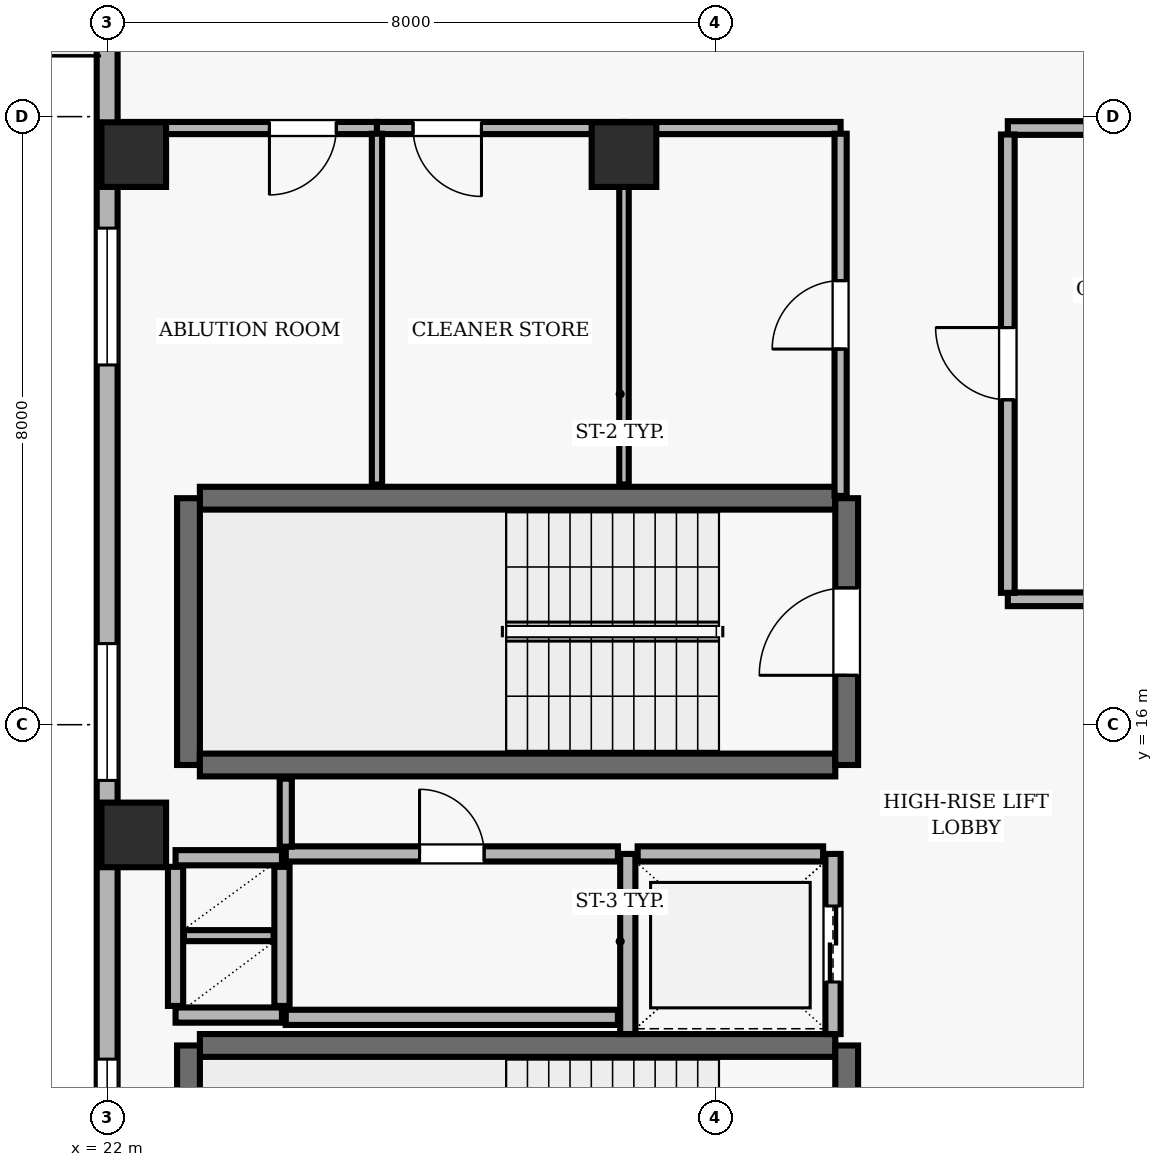
"""IFC4 building model, lengths in metres.
Left out: names, types, materials, properties, quantities, classifications, styles, units other than length and angle.
Written with IfcOpenShell. Run it as: python <this file> out.ifc"""

import sys

from ifc_helpers import new_model, si_unit, direction, frame, frame_2d, origin, origin_2d, place, context, subcontext, project, spatial, rectangle, extrude, element, fill, save


model = new_model("IFC4")
c1 = context("Model", 3, precision=1e-05, world=origin(), true_north=direction((0.0, 1.0)))
c2 = subcontext(c1, "Body", "Model", "MODEL_VIEW")
j1 = project(units=[si_unit("LENGTHUNIT", "METRE"), si_unit("PLANEANGLEUNIT", "RADIAN")], contexts=[c1])
p1 = place(None, origin())
s1 = spatial("IfcSite", under=j1, at=p1, CompositionType="ELEMENT")
p2 = place(p1, origin())
s2 = spatial("IfcBuilding", under=s1, at=p2, CompositionType="ELEMENT")
p3 = place(p2, frame((0.0, 0.0, 283.3)))
s3 = spatial("IfcBuildingStorey", under=s2, at=p3, CompositionType="ELEMENT", Elevation=283.3)
for number, where, z_axis, x_axis in (
    (1, (22.35, 14.55, 0.0), (0.0, 0.0, 1.0), (1.0, 0.0, 0.0)),
    (2, (22.35, 23.5, 0.0), (0.0, 0.0, 1.0), (1.0, 0.0, 0.0)),
    (3, (28.8, 23.5, 0.0), (0.0, 0.0, 1.0), (1.0, 0.0, 0.0)),
):
    element("IfcColumn", number, at=place(p3, frame(where, z_axis=z_axis, x_axis=x_axis)), inside=s3, PredefinedType="COLUMN", context=c2, shape_type="SweptSolid", body=[
        extrude(rectangle(XDim=0.85, YDim=0.85, at=origin_2d()), origin(), (0.0, 0.0, 1.0), 3.9),
    ])
p4 = place(p3, frame((22.0, 35.3, 0.0), z_axis=(0.0, 0.0, 1.0), x_axis=(0.0, -1.0, 0.0)))
e4 = element("IfcWall", 4, at=p4, inside=s3, PredefinedType="SOLIDWALL", context=c2, shape_type="SweptSolid", body=[
    extrude(rectangle(XDim=32.8, YDim=0.275, at=frame_2d((16.4, 0.0))), origin(), (0.0, 0.0, 1.0), 3.69),
])
p5 = place(p4, frame((7.3, 0.0, 0.0)))
e5 = element("IfcOpeningElement", 5, at=p5, cuts=e4, PredefinedType="OPENING", context=c2, shape_type="SweptSolid", body=[
    extrude(rectangle(XDim=1.0, YDim=2.2, at=frame_2d((0.5, 1.1))), frame((0.0, 0.147, 0.0), z_axis=(0.0, -1.0, 0.0), x_axis=(1.0, 0.0, 0.0)), (0.0, 0.0, 1.0), 0.295),
])
p6 = place(p4, frame((12.767, 0.0, 0.9)))
e6 = element("IfcOpeningElement", 6, at=p6, cuts=e4, PredefinedType="OPENING", context=c2, shape_type="SweptSolid", body=[
    extrude(rectangle(XDim=1.8, YDim=2.2, at=frame_2d((0.9, 1.1))), frame((0.0, 0.147, 0.0), z_axis=(0.0, -1.0, 0.0), x_axis=(1.0, 0.0, 0.0)), (0.0, 0.0, 1.0), 0.295),
])
p7 = place(p4, frame((18.233, 0.0, 0.9)))
e7 = element("IfcOpeningElement", 7, at=p7, cuts=e4, PredefinedType="OPENING", context=c2, shape_type="SweptSolid", body=[
    extrude(rectangle(XDim=1.8, YDim=2.2, at=frame_2d((0.9, 1.1))), frame((0.0, 0.147, 0.0), z_axis=(0.0, -1.0, 0.0), x_axis=(1.0, 0.0, 0.0)), (0.0, 0.0, 1.0), 0.295),
])
p8 = place(p4, frame((23.7, 0.0, 0.9)))
e8 = element("IfcOpeningElement", 8, at=p8, cuts=e4, PredefinedType="OPENING", context=c2, shape_type="SweptSolid", body=[
    extrude(rectangle(XDim=1.8, YDim=2.2, at=frame_2d((0.9, 1.1))), frame((0.0, 0.147, 0.0), z_axis=(0.0, -1.0, 0.0), x_axis=(1.0, 0.0, 0.0)), (0.0, 0.0, 1.0), 0.295),
])
p9 = place(p3, frame((31.58, 18.98, 0.0), z_axis=(0.0, 0.0, 1.0), x_axis=(-1.0, 0.0, 0.0)))
e9 = element("IfcWall", 9, at=p9, inside=s3, PredefinedType="SHEAR", context=c2, shape_type="SweptSolid", body=[
    extrude(rectangle(XDim=8.36, YDim=0.3, at=frame_2d((4.18, 0.0))), origin(), (0.0, 0.0, 1.0), 3.69),
])
p10 = place(p3, frame((23.07, 18.98, 0.0), z_axis=(0.0, 0.0, 1.0), x_axis=(0.0, -1.0, 0.0)))
e10 = element("IfcWall", 10, at=p10, inside=s3, PredefinedType="SHEAR", context=c2, shape_type="SweptSolid", body=[
    extrude(rectangle(XDim=3.51, YDim=0.3, at=frame_2d((1.755, 0.0))), origin(), (0.0, 0.0, 1.0), 3.69),
])
p11 = place(p3, frame((23.22, 15.47, 0.0), z_axis=(0.0, 0.0, 1.0), x_axis=(1.0, 0.0, 0.0)))
e11 = element("IfcWall", 11, at=p11, inside=s3, PredefinedType="SHEAR", context=c2, shape_type="SweptSolid", body=[
    extrude(rectangle(XDim=8.36, YDim=0.3, at=frame_2d((4.18, 0.0))), origin(), (0.0, 0.0, 1.0), 3.69),
])
p12 = place(p3, frame((31.73, 15.47, 0.0), z_axis=(0.0, 0.0, 1.0), x_axis=(0.0, 1.0, 0.0)))
e12 = element("IfcWall", 12, at=p12, inside=s3, PredefinedType="SHEAR", context=c2, shape_type="SweptSolid", body=[
    extrude(rectangle(XDim=3.51, YDim=0.3, at=frame_2d((1.755, 0.0))), origin(), (0.0, 0.0, 1.0), 3.69),
])
p13 = place(p12, frame((1.18, 0.0, 0.0)))
e13 = element("IfcOpeningElement", 13, at=p13, cuts=e12, PredefinedType="OPENING", context=c2, shape_type="SweptSolid", body=[
    extrude(rectangle(XDim=1.15, YDim=2.15, at=frame_2d((0.575, 1.075))), frame((0.0, 0.16, 0.0), z_axis=(0.0, -1.0, 0.0), x_axis=(1.0, 0.0, 0.0)), (0.0, 0.0, 1.0), 0.32),
])
p14 = place(p3, frame((31.58, 11.78, 0.0), z_axis=(0.0, 0.0, 1.0), x_axis=(-1.0, 0.0, 0.0)))
e14 = element("IfcWall", 14, at=p14, inside=s3, PredefinedType="SHEAR", context=c2, shape_type="SweptSolid", body=[
    extrude(rectangle(XDim=8.36, YDim=0.3, at=frame_2d((4.18, 0.0))), origin(), (0.0, 0.0, 1.0), 3.69),
])
p15 = place(p3, frame((23.07, 11.78, 0.0), z_axis=(0.0, 0.0, 1.0), x_axis=(0.0, -1.0, 0.0)))
e15 = element("IfcWall", 15, at=p15, inside=s3, PredefinedType="SHEAR", context=c2, shape_type="SweptSolid", body=[
    extrude(rectangle(XDim=3.51, YDim=0.3, at=frame_2d((1.755, 0.0))), origin(), (0.0, 0.0, 1.0), 3.69),
])
p16 = place(p3, frame((31.73, 8.27, 0.0), z_axis=(0.0, 0.0, 1.0), x_axis=(0.0, 1.0, 0.0)))
e16 = element("IfcWall", 16, at=p16, inside=s3, PredefinedType="SHEAR", context=c2, shape_type="SweptSolid", body=[
    extrude(rectangle(XDim=3.51, YDim=0.3, at=frame_2d((1.755, 0.0))), origin(), (0.0, 0.0, 1.0), 3.69),
])
p17 = place(p16, frame((1.18, 0.0, 0.0)))
e17 = element("IfcOpeningElement", 17, at=p17, cuts=e16, PredefinedType="OPENING", context=c2, shape_type="SweptSolid", body=[
    extrude(rectangle(XDim=1.15, YDim=2.15, at=frame_2d((0.575, 1.075))), frame((0.0, 0.16, 0.0), z_axis=(0.0, -1.0, 0.0), x_axis=(1.0, 0.0, 0.0)), (0.0, 0.0, 1.0), 0.32),
])
p18 = place(p3, frame((28.85, 14.3, 0.0), z_axis=(0.0, 0.0, 1.0), x_axis=(0.0, -1.0, 0.0)))
e18 = element("IfcWall", 18, at=p18, inside=s3, PredefinedType="SOLIDWALL", context=c2, shape_type="SweptSolid", body=[
    extrude(rectangle(XDim=2.37, YDim=0.2, at=frame_2d((1.185, 0.0))), origin(), (0.0, 0.0, 1.0), 3.69),
])
p19 = place(p3, frame((31.55, 11.93, 0.0), z_axis=(0.0, 0.0, 1.0), x_axis=(0.0, 1.0, 0.0)))
e19 = element("IfcWall", 19, at=p19, inside=s3, PredefinedType="SOLIDWALL", context=c2, shape_type="SweptSolid", body=[
    extrude(rectangle(XDim=2.37, YDim=0.2, at=frame_2d((1.185, 0.0))), origin(), (0.0, 0.0, 1.0), 3.69),
])
p20 = place(p19, frame((0.685, 0.0, 0.0)))
e20 = element("IfcOpeningElement", 20, at=p20, cuts=e19, PredefinedType="OPENING", context=c2, shape_type="SweptSolid", body=[
    extrude(rectangle(XDim=1.0, YDim=2.1, at=frame_2d((0.5, 1.05))), frame((0.0, 0.11, 0.0), z_axis=(0.0, -1.0, 0.0), x_axis=(1.0, 0.0, 0.0)), (0.0, 0.0, 1.0), 0.22),
])
p21 = place(p3, frame((31.42, 14.3, 0.0), z_axis=(0.0, 0.0, 1.0), x_axis=(-1.0, 0.0, 0.0)))
e21 = element("IfcWall", 21, at=p21, inside=s3, PredefinedType="SOLIDWALL", context=c2, shape_type="SweptSolid", body=[
    extrude(rectangle(XDim=2.44, YDim=0.2, at=frame_2d((1.22, 0.0))), origin(), (0.0, 0.0, 1.0), 3.69),
])
for number, where, z_axis, x_axis in (
    (22, (22.9, 14.25, 0.0), (0.0, 0.0, 1.0), (1.0, 0.0, 0.0)),
    (23, (22.9, 12.18, 0.0), (0.0, 0.0, 1.0), (1.0, 0.0, 0.0)),
):
    element("IfcWall", number, at=place(p3, frame(where, z_axis=z_axis, x_axis=x_axis)), inside=s3, PredefinedType="SOLIDWALL", context=c2, shape_type="SweptSolid", body=[
        extrude(rectangle(XDim=1.4, YDim=0.2, at=frame_2d((0.7, 0.0))), origin(), (0.0, 0.0, 1.0), 3.69),
    ])
for number, where, z_axis, x_axis in (
    (24, (24.3, 12.3, 0.0), (0.0, 0.0, 1.0), (0.0, 1.0, 0.0)),
    (25, (22.9, 12.3, 0.0), (0.0, 0.0, 1.0), (0.0, 1.0, 0.0)),
):
    element("IfcWall", number, at=place(p3, frame(where, z_axis=z_axis, x_axis=x_axis)), inside=s3, PredefinedType="SOLIDWALL", context=c2, shape_type="SweptSolid", body=[
        extrude(rectangle(XDim=1.83, YDim=0.2, at=frame_2d((0.915, 0.0))), origin(), (0.0, 0.0, 1.0), 3.69),
    ])
p22 = place(p3, frame((23.01, 13.225, 0.0), z_axis=(0.0, 0.0, 1.0), x_axis=(1.0, 0.0, 0.0)))
e26 = element("IfcWall", 26, at=p22, inside=s3, PredefinedType="PARTITIONING", context=c2, shape_type="SweptSolid", body=[
    extrude(rectangle(XDim=1.18, YDim=0.145, at=frame_2d((0.59, 0.0))), origin(), (0.0, 0.0, 1.0), 3.69),
])
p23 = place(p3, frame((24.35, 12.15, 0.0), z_axis=(0.0, 0.0, 1.0), x_axis=(1.0, 0.0, 0.0)))
e27 = element("IfcWall", 27, at=p23, inside=s3, PredefinedType="SOLIDWALL", context=c2, shape_type="SweptSolid", body=[
    extrude(rectangle(XDim=4.37, YDim=0.2, at=frame_2d((2.185, 0.0))), origin(), (0.0, 0.0, 1.0), 3.69),
])
p24 = place(p3, frame((24.35, 14.3, 0.0), z_axis=(0.0, 0.0, 1.0), x_axis=(1.0, 0.0, 0.0)))
e28 = element("IfcWall", 28, at=p24, inside=s3, PredefinedType="SOLIDWALL", context=c2, shape_type="SweptSolid", body=[
    extrude(rectangle(XDim=4.37, YDim=0.2, at=frame_2d((2.185, 0.0))), origin(), (0.0, 0.0, 1.0), 3.69),
])
p25 = place(p24, frame((1.76, 0.0, 0.0)))
e29 = element("IfcOpeningElement", 29, at=p25, cuts=e28, PredefinedType="OPENING", context=c2, shape_type="SweptSolid", body=[
    extrude(rectangle(XDim=0.85, YDim=2.1, at=frame_2d((0.425, 1.05))), frame((0.0, 0.11, 0.0), z_axis=(0.0, -1.0, 0.0), x_axis=(1.0, 0.0, 0.0)), (0.0, 0.0, 1.0), 0.22),
])
p26 = place(p3, frame((25.55, 23.85, 0.0), z_axis=(0.0, 0.0, 1.0), x_axis=(-1.0, 0.0, 0.0)))
e30 = element("IfcWall", 30, at=p26, inside=s3, PredefinedType="PARTITIONING", context=c2, shape_type="SweptSolid", body=[
    extrude(rectangle(XDim=3.35, YDim=0.16, at=frame_2d((1.675, 0.0))), origin(), (0.0, 0.0, 1.0), 3.227),
])
p27 = place(p26, frame((0.535, 0.0, 0.0)))
e31 = element("IfcOpeningElement", 31, at=p27, cuts=e30, PredefinedType="OPENING", context=c2, shape_type="SweptSolid", body=[
    extrude(rectangle(XDim=0.88, YDim=2.1, at=frame_2d((0.44, 1.05))), frame((0.0, 0.09, 0.0), z_axis=(0.0, -1.0, 0.0), x_axis=(1.0, 0.0, 0.0)), (0.0, 0.0, 1.0), 0.18),
])
p28 = place(p3, frame((28.8, 23.85, 0.0), z_axis=(0.0, 0.0, 1.0), x_axis=(-1.0, 0.0, 0.0)))
e32 = element("IfcWall", 32, at=p28, inside=s3, PredefinedType="PARTITIONING", context=c2, shape_type="SweptSolid", body=[
    extrude(rectangle(XDim=3.25, YDim=0.16, at=frame_2d((1.625, 0.0))), origin(), (0.0, 0.0, 1.0), 3.227),
])
p29 = place(p28, frame((1.875, 0.0, 0.0)))
e33 = element("IfcOpeningElement", 33, at=p29, cuts=e32, PredefinedType="OPENING", context=c2, shape_type="SweptSolid", body=[
    extrude(rectangle(XDim=0.9, YDim=2.1, at=frame_2d((0.45, 1.05))), frame((0.0, 0.09, 0.0), z_axis=(0.0, -1.0, 0.0), x_axis=(1.0, 0.0, 0.0)), (0.0, 0.0, 1.0), 0.18),
])
p30 = place(p3, frame((31.65, 23.85, 0.0), z_axis=(0.0, 0.0, 1.0), x_axis=(-1.0, 0.0, 0.0)))
e34 = element("IfcWall", 34, at=p30, inside=s3, PredefinedType="PARTITIONING", context=c2, shape_type="SweptSolid", body=[
    extrude(rectangle(XDim=2.85, YDim=0.16, at=frame_2d((1.425, 0.0))), origin(), (0.0, 0.0, 1.0), 3.227),
])
p31 = place(p3, frame((33.85, 17.65, 0.0), z_axis=(0.0, 0.0, 1.0), x_axis=(1.0, 0.0, 0.0)))
e35 = element("IfcWall", 35, at=p31, inside=s3, PredefinedType="PARTITIONING", context=c2, shape_type="SweptSolid", body=[
    extrude(rectangle(XDim=1.3, YDim=0.18, at=frame_2d((0.65, 0.0))), origin(), (0.0, 0.0, 1.0), 3.69),
])
p32 = place(p3, frame((37.85, 23.85, 0.0), z_axis=(0.0, 0.0, 1.0), x_axis=(-1.0, 0.0, 0.0)))
e36 = element("IfcWall", 36, at=p32, inside=s3, PredefinedType="PARTITIONING", context=c2, shape_type="SweptSolid", body=[
    extrude(rectangle(XDim=4.0, YDim=0.18, at=frame_2d((2.0, 0.0))), origin(), (0.0, 0.0, 1.0), 3.227),
])
p33 = place(p3, frame((24.35, 15.29, 0.0), z_axis=(0.0, 0.0, 1.0), x_axis=(0.0, -1.0, 0.0)))
e37 = element("IfcWall", 37, at=p33, inside=s3, PredefinedType="PARTITIONING", context=c2, shape_type="SweptSolid", body=[
    extrude(rectangle(XDim=0.895, YDim=0.16, at=frame_2d((0.448, 0.0))), origin(), (0.0, 0.0, 1.0), 3.69),
])
p34 = place(p3, frame((25.55, 19.16, 0.0), z_axis=(0.0, 0.0, 1.0), x_axis=(0.0, 1.0, 0.0)))
e38 = element("IfcWall", 38, at=p34, inside=s3, PredefinedType="PARTITIONING", context=c2, shape_type="SweptSolid", body=[
    extrude(rectangle(XDim=4.615, YDim=0.135, at=frame_2d((2.308, 0.0))), origin(), (0.0, 0.0, 1.0), 3.69),
])
p35 = place(p3, frame((28.8, 23.775, 0.0), z_axis=(0.0, 0.0, 1.0), x_axis=(0.0, -1.0, 0.0)))
e39 = element("IfcWall", 39, at=p35, inside=s3, PredefinedType="PARTITIONING", context=c2, shape_type="SweptSolid", body=[
    extrude(rectangle(XDim=4.615, YDim=0.125, at=frame_2d((2.308, 0.0))), origin(), (0.0, 0.0, 1.0), 3.69),
])
p36 = place(p3, frame((31.65, 19.01, 0.0), z_axis=(0.0, 0.0, 1.0), x_axis=(0.0, 1.0, 0.0)))
e40 = element("IfcWall", 40, at=p36, inside=s3, PredefinedType="PARTITIONING", context=c2, shape_type="SweptSolid", body=[
    extrude(rectangle(XDim=4.765, YDim=0.16, at=frame_2d((2.382, 0.0))), origin(), (0.0, 0.0, 1.0), 3.69),
])
p37 = place(p36, frame((1.932, 0.0, 0.0)))
e41 = element("IfcOpeningElement", 41, at=p37, cuts=e40, PredefinedType="OPENING", context=c2, shape_type="SweptSolid", body=[
    extrude(rectangle(XDim=0.9, YDim=2.1, at=frame_2d((0.45, 1.05))), frame((0.0, 0.09, 0.0), z_axis=(0.0, -1.0, 0.0), x_axis=(1.0, 0.0, 0.0)), (0.0, 0.0, 1.0), 0.18),
])
p38 = place(p3, frame((33.85, 17.735, 0.0), z_axis=(0.0, 0.0, 1.0), x_axis=(0.0, 1.0, 0.0)))
e42 = element("IfcWall", 42, at=p38, inside=s3, PredefinedType="PARTITIONING", context=c2, shape_type="SweptSolid", body=[
    extrude(rectangle(XDim=6.03, YDim=0.18, at=frame_2d((3.015, 0.0))), origin(), (0.0, 0.0, 1.0), 3.69),
])
p39 = place(p38, frame((2.54, 0.0, 0.0)))
e43 = element("IfcOpeningElement", 43, at=p39, cuts=e42, PredefinedType="OPENING", context=c2, shape_type="SweptSolid", body=[
    extrude(rectangle(XDim=0.95, YDim=2.1, at=frame_2d((0.475, 1.05))), frame((0.0, 0.1, 0.0), z_axis=(0.0, -1.0, 0.0), x_axis=(1.0, 0.0, 0.0)), (0.0, 0.0, 1.0), 0.2),
])
p40 = place(p6, origin())
e44 = element("IfcWindow", 44, at=p40, inside=s3, PartitioningType="SINGLE_PANEL", PredefinedType="WINDOW", context=c2, shape_type="SweptSolid", body=[
    extrude(rectangle(XDim=1.8, YDim=2.2, at=frame_2d((0.9, 1.1))), frame((0.0, 0.03, 0.0), z_axis=(0.0, -1.0, 0.0), x_axis=(1.0, 0.0, 0.0)), (0.0, 0.0, 1.0), 0.06),
])
fill(e6, e44)
p41 = place(p7, origin())
e45 = element("IfcWindow", 45, at=p41, inside=s3, PartitioningType="SINGLE_PANEL", PredefinedType="WINDOW", context=c2, shape_type="SweptSolid", body=[
    extrude(rectangle(XDim=1.8, YDim=2.2, at=frame_2d((0.9, 1.1))), frame((0.0, 0.03, 0.0), z_axis=(0.0, -1.0, 0.0), x_axis=(1.0, 0.0, 0.0)), (0.0, 0.0, 1.0), 0.06),
])
fill(e7, e45)
p42 = place(p8, origin())
e46 = element("IfcWindow", 46, at=p42, inside=s3, PartitioningType="SINGLE_PANEL", PredefinedType="WINDOW", context=c2, shape_type="SweptSolid", body=[
    extrude(rectangle(XDim=1.8, YDim=2.2, at=frame_2d((0.9, 1.1))), frame((0.0, 0.03, 0.0), z_axis=(0.0, -1.0, 0.0), x_axis=(1.0, 0.0, 0.0)), (0.0, 0.0, 1.0), 0.06),
])
fill(e8, e46)
p43 = place(p13, origin())
e47 = element("IfcDoor", 47, at=p43, inside=s3, OperationType="SINGLE_SWING_LEFT", PredefinedType="DOOR", context=c2, shape_type="SweptSolid", body=[
    extrude(rectangle(XDim=1.15, YDim=2.15, at=frame_2d((0.575, 1.075))), frame((0.0, 0.025, 0.0), z_axis=(0.0, -1.0, 0.0), x_axis=(1.0, 0.0, 0.0)), (0.0, 0.0, 1.0), 0.05),
])
fill(e13, e47)
p44 = place(p20, origin())
e48 = element("IfcDoor", 48, at=p44, inside=s3, OperationType="DOUBLE_DOOR_SLIDING", PredefinedType="DOOR", context=c2, shape_type="SweptSolid", body=[
    extrude(rectangle(XDim=1.0, YDim=2.1, at=frame_2d((0.5, 1.05))), frame((0.0, 0.025, 0.0), z_axis=(0.0, -1.0, 0.0), x_axis=(1.0, 0.0, 0.0)), (0.0, 0.0, 1.0), 0.05),
])
fill(e20, e48)
p45 = place(p39, origin())
e49 = element("IfcDoor", 49, at=p45, inside=s3, OperationType="SINGLE_SWING_RIGHT", PredefinedType="DOOR", context=c2, shape_type="SweptSolid", body=[
    extrude(rectangle(XDim=0.95, YDim=2.1, at=frame_2d((0.475, 1.05))), frame((0.0, 0.025, 0.0), z_axis=(0.0, -1.0, 0.0), x_axis=(1.0, 0.0, 0.0)), (0.0, 0.0, 1.0), 0.05),
])
fill(e43, e49)
p46 = place(p37, origin())
e50 = element("IfcDoor", 50, at=p46, inside=s3, OperationType="SINGLE_SWING_LEFT", PredefinedType="DOOR", context=c2, shape_type="SweptSolid", body=[
    extrude(rectangle(XDim=0.9, YDim=2.1, at=frame_2d((0.45, 1.05))), frame((0.0, 0.025, 0.0), z_axis=(0.0, -1.0, 0.0), x_axis=(1.0, 0.0, 0.0)), (0.0, 0.0, 1.0), 0.05),
])
fill(e41, e50)
p47 = place(p25, origin())
e51 = element("IfcDoor", 51, at=p47, inside=s3, OperationType="SINGLE_SWING_LEFT", PredefinedType="DOOR", context=c2, shape_type="SweptSolid", body=[
    extrude(rectangle(XDim=0.85, YDim=2.1, at=frame_2d((0.425, 1.05))), frame((0.0, 0.025, 0.0), z_axis=(0.0, -1.0, 0.0), x_axis=(1.0, 0.0, 0.0)), (0.0, 0.0, 1.0), 0.05),
])
fill(e29, e51)
p48 = place(p27, origin())
e52 = element("IfcDoor", 52, at=p48, inside=s3, OperationType="SINGLE_SWING_RIGHT", PredefinedType="DOOR", context=c2, shape_type="SweptSolid", body=[
    extrude(rectangle(XDim=0.88, YDim=2.1, at=frame_2d((0.44, 1.05))), frame((0.0, 0.025, 0.0), z_axis=(0.0, -1.0, 0.0), x_axis=(1.0, 0.0, 0.0)), (0.0, 0.0, 1.0), 0.05),
])
fill(e31, e52)
p49 = place(p29, origin())
e53 = element("IfcDoor", 53, at=p49, inside=s3, OperationType="SINGLE_SWING_LEFT", PredefinedType="DOOR", context=c2, shape_type="SweptSolid", body=[
    extrude(rectangle(XDim=0.9, YDim=2.1, at=frame_2d((0.45, 1.05))), frame((0.0, 0.025, 0.0), z_axis=(0.0, -1.0, 0.0), x_axis=(1.0, 0.0, 0.0)), (0.0, 0.0, 1.0), 0.05),
])
fill(e33, e53)
save(model, sys.argv[1])
